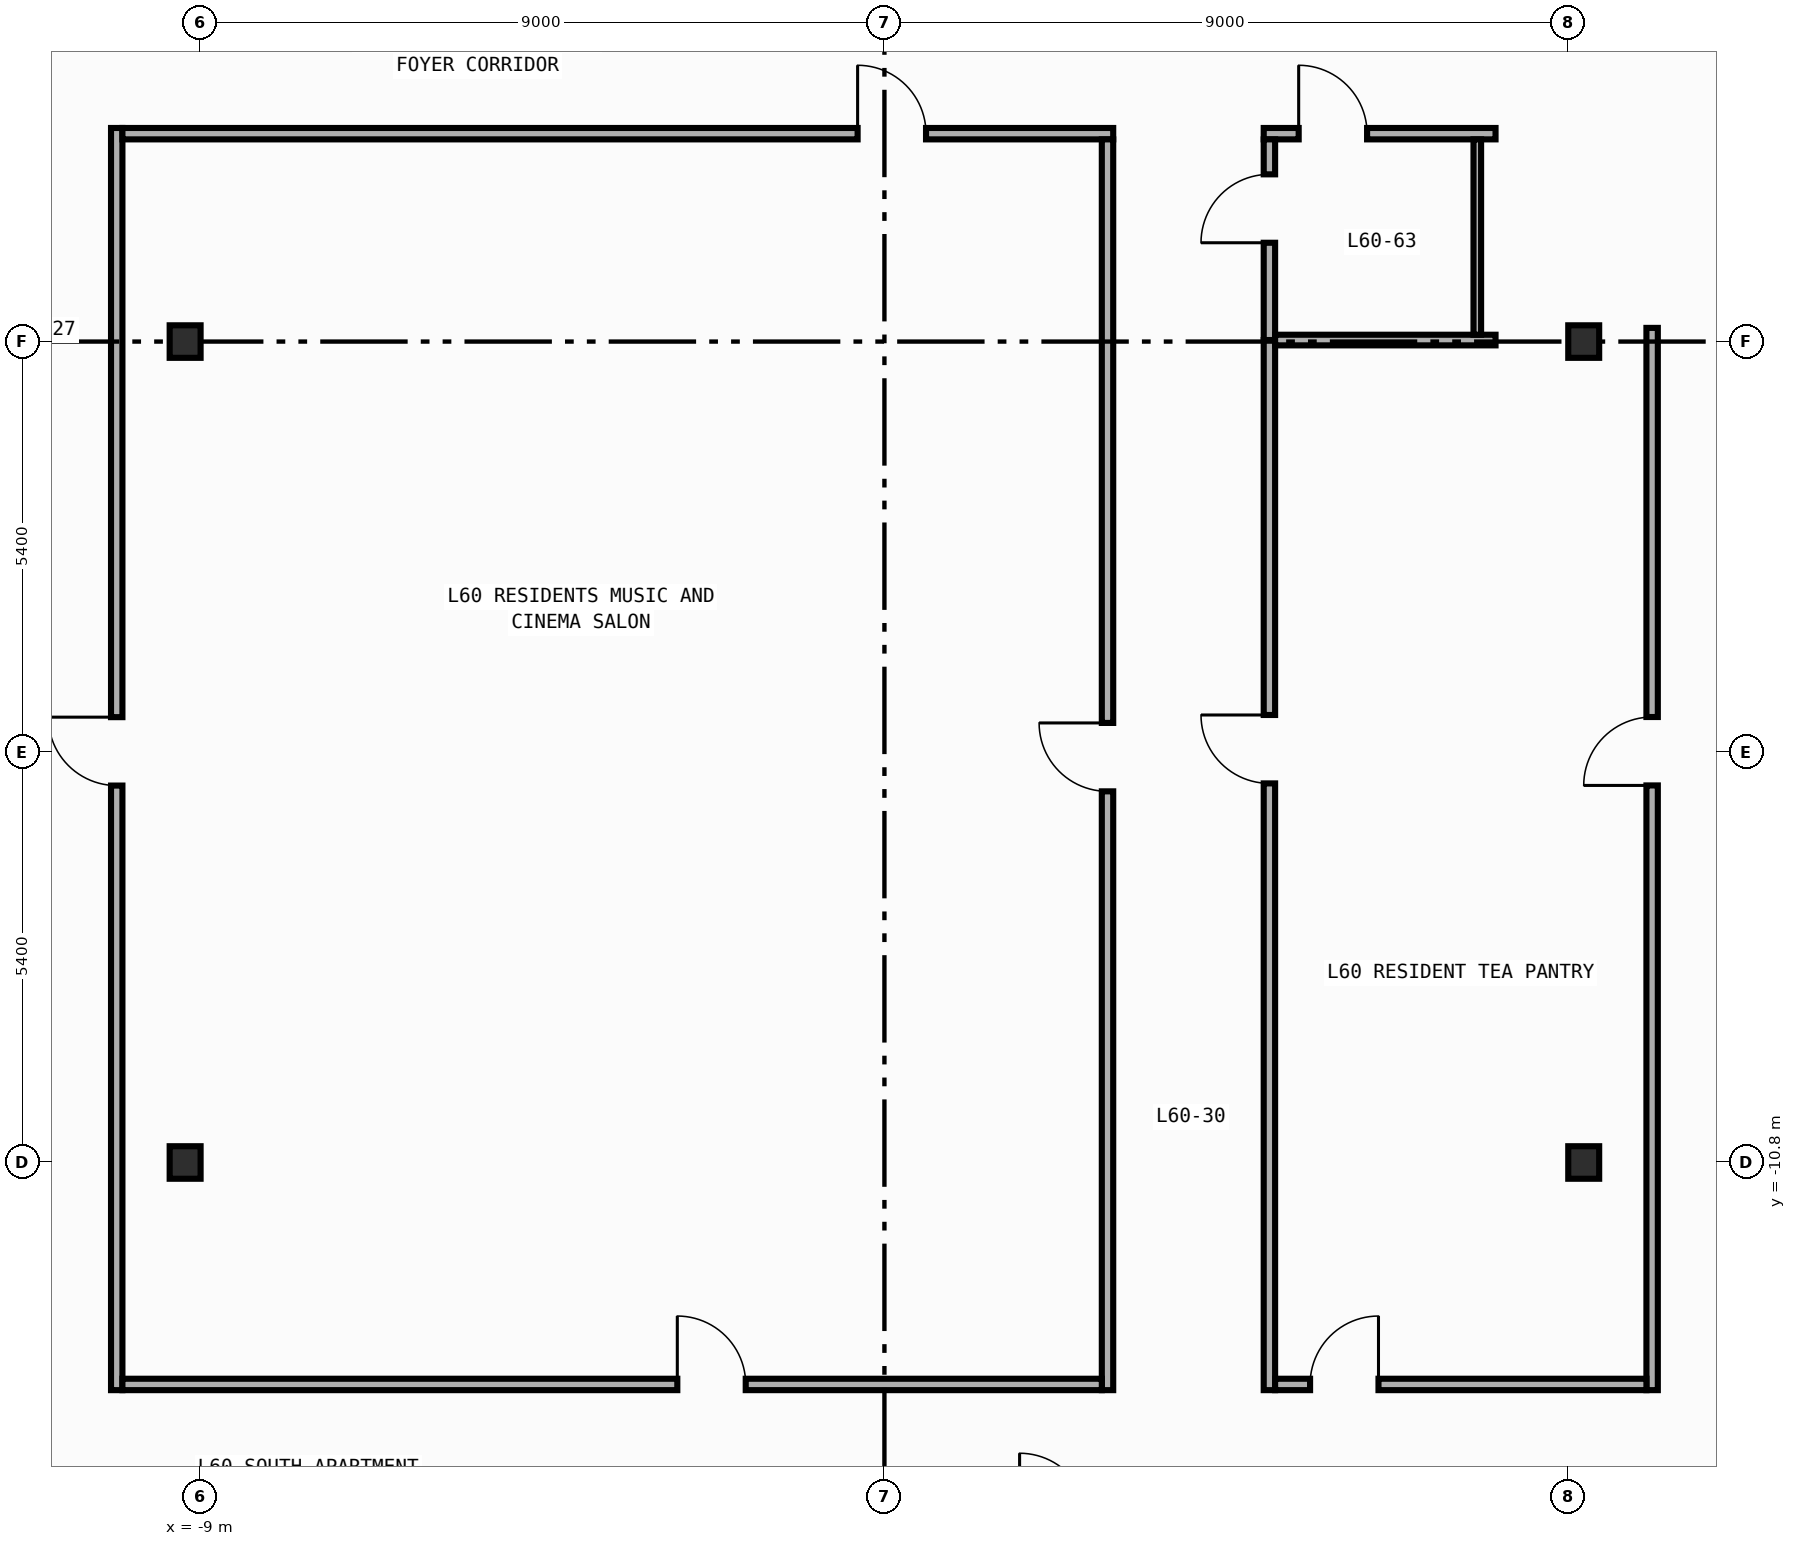
"""IFC4 building model, lengths in metres.
Left out: names, types, materials, properties, quantities, classifications, styles, units other than length and angle.
Written with IfcOpenShell. Run it as: python <this file> out.ifc"""

import sys

from ifc_helpers import new_model, si_unit, direction, frame, frame_2d, origin, origin_2d, place, context, subcontext, project, spatial, rectangle, i_section, extrude, element, fill, save


model = new_model("IFC4")
c1 = context("Model", 3, precision=1e-05, world=origin(), true_north=direction((0.0, 1.0)))
c2 = subcontext(c1, "Body", "Model", "MODEL_VIEW")
j1 = project(units=[si_unit("LENGTHUNIT", "METRE"), si_unit("PLANEANGLEUNIT", "RADIAN")], contexts=[c1])
p1 = place(None, origin())
s1 = spatial("IfcSite", under=j1, at=p1, CompositionType="ELEMENT")
p2 = place(p1, origin())
s2 = spatial("IfcBuilding", under=s1, at=p2, CompositionType="ELEMENT")
p3 = place(p2, frame((0.0, 0.0, 254.8)))
s3 = spatial("IfcBuildingStorey", under=s2, at=p3, CompositionType="ELEMENT", Elevation=254.8)
for number, where, z_axis, x_axis in (
    (1, (-9.2, -10.8, 0.0), (0.0, 0.0, 1.0), (1.0, 0.0, 0.0)),
    (2, (-9.2, 0.0, 0.0), (0.0, 0.0, 1.0), (1.0, 0.0, 0.0)),
    (3, (9.2, -10.8, 0.0), (0.0, 0.0, 1.0), (1.0, 0.0, 0.0)),
    (4, (9.2, 0.0, 0.0), (0.0, 0.0, 1.0), (1.0, 0.0, 0.0)),
):
    element("IfcColumn", number, at=place(p3, frame(where, z_axis=z_axis, x_axis=x_axis)), inside=s3, PredefinedType="COLUMN", context=c2, shape_type="SweptSolid", body=[
        extrude(i_section(OverallWidth=0.407, OverallDepth=0.428, WebThickness=0.02, FlangeThickness=0.035, FilletRadius=0.022, at=origin_2d()), origin(), (0.0, 0.0, 1.0), 3.6),
    ])
p4 = place(p3, frame((-10.1, -13.795, 0.0), z_axis=(0.0, 0.0, 1.0), x_axis=(0.0, 1.0, 0.0)))
e5 = element("IfcWall", 5, at=p4, inside=s3, PredefinedType="PARTITIONING", context=c2, shape_type="SweptSolid", body=[
    extrude(rectangle(XDim=16.605, YDim=0.15, at=frame_2d((8.302, 0.0))), origin(), (0.0, 0.0, 1.0), 3.34),
])
p5 = place(p4, frame((7.954, 0.0, 0.0)))
e6 = element("IfcOpeningElement", 6, at=p5, cuts=e5, PredefinedType="OPENING", context=c2, shape_type="SweptSolid", body=[
    extrude(rectangle(XDim=0.9, YDim=2.15, at=frame_2d((0.45, 1.075))), frame((0.0, 0.085, 0.0), z_axis=(0.0, -1.0, 0.0), x_axis=(1.0, 0.0, 0.0)), (0.0, 0.0, 1.0), 0.17),
])
p6 = place(p3, frame((10.1, -13.795, 0.0), z_axis=(0.0, 0.0, 1.0), x_axis=(0.0, 1.0, 0.0)))
e7 = element("IfcWall", 7, at=p6, inside=s3, PredefinedType="PARTITIONING", context=c2, shape_type="SweptSolid", body=[
    extrude(rectangle(XDim=13.975, YDim=0.15, at=frame_2d((6.987, 0.0))), origin(), (0.0, 0.0, 1.0), 3.34),
])
p7 = place(p6, frame((7.956, 0.0, 0.0)))
e8 = element("IfcOpeningElement", 8, at=p7, cuts=e7, PredefinedType="OPENING", context=c2, shape_type="SweptSolid", body=[
    extrude(rectangle(XDim=0.9, YDim=2.15, at=frame_2d((0.45, 1.075))), frame((0.0, 0.085, 0.0), z_axis=(0.0, -1.0, 0.0), x_axis=(1.0, 0.0, 0.0)), (0.0, 0.0, 1.0), 0.17),
])
p8 = place(p3, frame((-10.025, 2.735, 0.0), z_axis=(0.0, 0.0, 1.0), x_axis=(1.0, 0.0, 0.0)))
e9 = element("IfcWall", 9, at=p8, inside=s3, PredefinedType="PARTITIONING", context=c2, shape_type="SweptSolid", body=[
    extrude(rectangle(XDim=13.035, YDim=0.15, at=frame_2d((6.518, 0.0))), origin(), (0.0, 0.0, 1.0), 3.34),
])
p9 = place(p8, frame((9.672, 0.0, 0.0)))
e10 = element("IfcOpeningElement", 10, at=p9, cuts=e9, PredefinedType="OPENING", context=c2, shape_type="SweptSolid", body=[
    extrude(rectangle(XDim=0.9, YDim=2.15, at=frame_2d((0.45, 1.075))), frame((0.0, 0.085, 0.0), z_axis=(0.0, -1.0, 0.0), x_axis=(1.0, 0.0, 0.0)), (0.0, 0.0, 1.0), 0.17),
])
p10 = place(p3, frame((4.99, 2.735, 0.0), z_axis=(0.0, 0.0, 1.0), x_axis=(1.0, 0.0, 0.0)))
e11 = element("IfcWall", 11, at=p10, inside=s3, PredefinedType="PARTITIONING", context=c2, shape_type="SweptSolid", body=[
    extrude(rectangle(XDim=3.05, YDim=0.15, at=frame_2d((1.525, 0.0))), origin(), (0.0, 0.0, 1.0), 3.34),
])
p11 = place(p10, frame((0.46, 0.0, 0.0)))
e12 = element("IfcOpeningElement", 12, at=p11, cuts=e11, PredefinedType="OPENING", context=c2, shape_type="SweptSolid", body=[
    extrude(rectangle(XDim=0.9, YDim=2.15, at=frame_2d((0.45, 1.075))), frame((0.0, 0.085, 0.0), z_axis=(0.0, -1.0, 0.0), x_axis=(1.0, 0.0, 0.0)), (0.0, 0.0, 1.0), 0.17),
])
p12 = place(p3, frame((2.935, -13.795, 0.0), z_axis=(0.0, 0.0, 1.0), x_axis=(0.0, 1.0, 0.0)))
e13 = element("IfcWall", 13, at=p12, inside=s3, PredefinedType="PARTITIONING", context=c2, shape_type="SweptSolid", body=[
    extrude(rectangle(XDim=16.455, YDim=0.15, at=frame_2d((8.228, 0.0))), origin(), (0.0, 0.0, 1.0), 3.34),
])
p13 = place(p12, frame((7.878, 0.0, 0.0)))
e14 = element("IfcOpeningElement", 14, at=p13, cuts=e13, PredefinedType="OPENING", context=c2, shape_type="SweptSolid", body=[
    extrude(rectangle(XDim=0.9, YDim=2.15, at=frame_2d((0.45, 1.075))), frame((0.0, 0.085, 0.0), z_axis=(0.0, -1.0, 0.0), x_axis=(1.0, 0.0, 0.0)), (0.0, 0.0, 1.0), 0.17),
])
p14 = place(p3, frame((5.065, 0.02, 0.0), z_axis=(0.0, 0.0, 1.0), x_axis=(0.0, 1.0, 0.0)))
e15 = element("IfcWall", 15, at=p14, inside=s3, PredefinedType="PARTITIONING", context=c2, shape_type="SweptSolid", body=[
    extrude(rectangle(XDim=2.64, YDim=0.15, at=frame_2d((1.32, 0.0))), origin(), (0.0, 0.0, 1.0), 2.99),
])
p15 = place(p14, frame((1.28, 0.0, 0.0)))
e16 = element("IfcOpeningElement", 16, at=p15, cuts=e15, PredefinedType="OPENING", context=c2, shape_type="SweptSolid", body=[
    extrude(rectangle(XDim=0.9, YDim=2.15, at=frame_2d((0.45, 1.075))), frame((0.0, 0.085, 0.0), z_axis=(0.0, -1.0, 0.0), x_axis=(1.0, 0.0, 0.0)), (0.0, 0.0, 1.0), 0.17),
])
p16 = place(p3, frame((5.065, -13.795, 0.0), z_axis=(0.0, 0.0, 1.0), x_axis=(0.0, 1.0, 0.0)))
e17 = element("IfcWall", 17, at=p16, inside=s3, PredefinedType="PARTITIONING", context=c2, shape_type="SweptSolid", body=[
    extrude(rectangle(XDim=13.815, YDim=0.15, at=frame_2d((6.907, 0.0))), origin(), (0.0, 0.0, 1.0), 2.99),
])
p17 = place(p16, frame((7.982, 0.0, 0.0)))
e18 = element("IfcOpeningElement", 18, at=p17, cuts=e17, PredefinedType="OPENING", context=c2, shape_type="SweptSolid", body=[
    extrude(rectangle(XDim=0.9, YDim=2.15, at=frame_2d((0.45, 1.075))), frame((0.0, 0.085, 0.0), z_axis=(0.0, -1.0, 0.0), x_axis=(1.0, 0.0, 0.0)), (0.0, 0.0, 1.0), 0.17),
])
p18 = place(p3, frame((-10.025, -13.72, 0.0), z_axis=(0.0, 0.0, 1.0), x_axis=(1.0, 0.0, 0.0)))
e19 = element("IfcWall", 19, at=p18, inside=s3, PredefinedType="PARTITIONING", context=c2, shape_type="SweptSolid", body=[
    extrude(rectangle(XDim=12.885, YDim=0.15, at=frame_2d((6.442, 0.0))), origin(), (0.0, 0.0, 1.0), 3.34),
])
p19 = place(p18, frame((7.3, 0.0, 0.0)))
e20 = element("IfcOpeningElement", 20, at=p19, cuts=e19, PredefinedType="OPENING", context=c2, shape_type="SweptSolid", body=[
    extrude(rectangle(XDim=0.9, YDim=2.15, at=frame_2d((0.45, 1.075))), frame((0.0, 0.085, 0.0), z_axis=(0.0, -1.0, 0.0), x_axis=(1.0, 0.0, 0.0)), (0.0, 0.0, 1.0), 0.17),
])
p20 = place(p3, frame((5.14, -13.72, 0.0), z_axis=(0.0, 0.0, 1.0), x_axis=(1.0, 0.0, 0.0)))
e21 = element("IfcWall", 21, at=p20, inside=s3, PredefinedType="PARTITIONING", context=c2, shape_type="SweptSolid", body=[
    extrude(rectangle(XDim=4.885, YDim=0.15, at=frame_2d((2.442, 0.0))), origin(), (0.0, 0.0, 1.0), 3.34),
])
p21 = place(p20, frame((0.46, 0.0, 0.0)))
e22 = element("IfcOpeningElement", 22, at=p21, cuts=e21, PredefinedType="OPENING", context=c2, shape_type="SweptSolid", body=[
    extrude(rectangle(XDim=0.9, YDim=2.15, at=frame_2d((0.45, 1.075))), frame((0.0, 0.085, 0.0), z_axis=(0.0, -1.0, 0.0), x_axis=(1.0, 0.0, 0.0)), (0.0, 0.0, 1.0), 0.17),
])
p22 = place(p3, frame((5.14, 0.02, 0.0), z_axis=(0.0, 0.0, 1.0), x_axis=(1.0, 0.0, 0.0)))
e23 = element("IfcWall", 23, at=p22, inside=s3, PredefinedType="PARTITIONING", context=c2, shape_type="SweptSolid", body=[
    extrude(rectangle(XDim=2.9, YDim=0.14, at=frame_2d((1.45, 0.0))), origin(), (0.0, 0.0, 1.0), 2.44),
])
p23 = place(p3, frame((7.8, 2.66, 0.0), z_axis=(0.0, 0.0, 1.0), x_axis=(0.0, -1.0, 0.0)))
e24 = element("IfcWall", 24, at=p23, inside=s3, PredefinedType="PARTITIONING", context=c2, shape_type="SweptSolid", body=[
    extrude(rectangle(XDim=2.57, YDim=0.1, at=frame_2d((1.285, 0.0))), origin(), (0.0, 0.0, 1.0), 3.34),
])
p24 = place(p5, origin())
e25 = element("IfcDoor", 25, at=p24, inside=s3, OperationType="SINGLE_SWING_RIGHT", PredefinedType="DOOR", context=c2, shape_type="SweptSolid", body=[
    extrude(rectangle(XDim=0.9, YDim=2.15, at=frame_2d((0.45, 1.075))), frame((0.0, 0.025, 0.0), z_axis=(0.0, -1.0, 0.0), x_axis=(1.0, 0.0, 0.0)), (0.0, 0.0, 1.0), 0.05),
])
fill(e6, e25)
p25 = place(p7, origin())
e26 = element("IfcDoor", 26, at=p25, inside=s3, OperationType="SINGLE_SWING_LEFT", PredefinedType="DOOR", context=c2, shape_type="SweptSolid", body=[
    extrude(rectangle(XDim=0.9, YDim=2.15, at=frame_2d((0.45, 1.075))), frame((0.0, 0.025, 0.0), z_axis=(0.0, -1.0, 0.0), x_axis=(1.0, 0.0, 0.0)), (0.0, 0.0, 1.0), 0.05),
])
fill(e8, e26)
p26 = place(p9, origin())
e27 = element("IfcDoor", 27, at=p26, inside=s3, OperationType="SINGLE_SWING_LEFT", PredefinedType="DOOR", context=c2, shape_type="SweptSolid", body=[
    extrude(rectangle(XDim=0.9, YDim=2.15, at=frame_2d((0.45, 1.075))), frame((0.0, 0.025, 0.0), z_axis=(0.0, -1.0, 0.0), x_axis=(1.0, 0.0, 0.0)), (0.0, 0.0, 1.0), 0.05),
])
fill(e10, e27)
p27 = place(p11, origin())
e28 = element("IfcDoor", 28, at=p27, inside=s3, OperationType="SINGLE_SWING_LEFT", PredefinedType="DOOR", context=c2, shape_type="SweptSolid", body=[
    extrude(rectangle(XDim=0.9, YDim=2.15, at=frame_2d((0.45, 1.075))), frame((0.0, 0.025, 0.0), z_axis=(0.0, -1.0, 0.0), x_axis=(1.0, 0.0, 0.0)), (0.0, 0.0, 1.0), 0.05),
])
fill(e12, e28)
p28 = place(p13, origin())
e29 = element("IfcDoor", 29, at=p28, inside=s3, OperationType="SINGLE_SWING_RIGHT", PredefinedType="DOOR", context=c2, shape_type="SweptSolid", body=[
    extrude(rectangle(XDim=0.9, YDim=2.15, at=frame_2d((0.45, 1.075))), frame((0.0, 0.025, 0.0), z_axis=(0.0, -1.0, 0.0), x_axis=(1.0, 0.0, 0.0)), (0.0, 0.0, 1.0), 0.05),
])
fill(e14, e29)
p29 = place(p15, origin())
e30 = element("IfcDoor", 30, at=p29, inside=s3, OperationType="SINGLE_SWING_LEFT", PredefinedType="DOOR", context=c2, shape_type="SweptSolid", body=[
    extrude(rectangle(XDim=0.9, YDim=2.15, at=frame_2d((0.45, 1.075))), frame((0.0, 0.025, 0.0), z_axis=(0.0, -1.0, 0.0), x_axis=(1.0, 0.0, 0.0)), (0.0, 0.0, 1.0), 0.05),
])
fill(e16, e30)
p30 = place(p17, origin())
e31 = element("IfcDoor", 31, at=p30, inside=s3, OperationType="SINGLE_SWING_RIGHT", PredefinedType="DOOR", context=c2, shape_type="SweptSolid", body=[
    extrude(rectangle(XDim=0.9, YDim=2.15, at=frame_2d((0.45, 1.075))), frame((0.0, 0.025, 0.0), z_axis=(0.0, -1.0, 0.0), x_axis=(1.0, 0.0, 0.0)), (0.0, 0.0, 1.0), 0.05),
])
fill(e18, e31)
p31 = place(p19, origin())
e32 = element("IfcDoor", 32, at=p31, inside=s3, OperationType="SINGLE_SWING_LEFT", PredefinedType="DOOR", context=c2, shape_type="SweptSolid", body=[
    extrude(rectangle(XDim=0.9, YDim=2.15, at=frame_2d((0.45, 1.075))), frame((0.0, 0.025, 0.0), z_axis=(0.0, -1.0, 0.0), x_axis=(1.0, 0.0, 0.0)), (0.0, 0.0, 1.0), 0.05),
])
fill(e20, e32)
p32 = place(p21, origin())
e33 = element("IfcDoor", 33, at=p32, inside=s3, OperationType="SINGLE_SWING_RIGHT", PredefinedType="DOOR", context=c2, shape_type="SweptSolid", body=[
    extrude(rectangle(XDim=0.9, YDim=2.15, at=frame_2d((0.45, 1.075))), frame((0.0, 0.025, 0.0), z_axis=(0.0, -1.0, 0.0), x_axis=(1.0, 0.0, 0.0)), (0.0, 0.0, 1.0), 0.05),
])
fill(e22, e33)
save(model, sys.argv[1])
